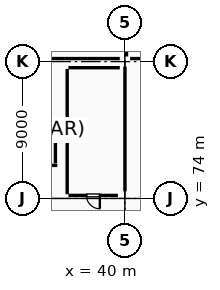
"""IFC4 building model, lengths in metres.
Left out: names, types, materials, properties, quantities, classifications, styles, units other than length and angle.
Written with IfcOpenShell. Run it as: python <this file> out.ifc"""

import sys

from ifc_helpers import new_model, si_unit, direction, frame, frame_2d, origin, origin_2d, place, context, subcontext, project, spatial, rectangle, extrude, element, fill, save


model = new_model("IFC4")
c1 = context("Model", 3, precision=1e-05, world=origin(), true_north=direction((0.0, 1.0)))
c2 = subcontext(c1, "Body", "Model", "MODEL_VIEW")
j1 = project(units=[si_unit("LENGTHUNIT", "METRE"), si_unit("PLANEANGLEUNIT", "RADIAN")], contexts=[c1])
p1 = place(None, origin())
s1 = spatial("IfcSite", under=j1, at=p1, CompositionType="ELEMENT")
p2 = place(p1, origin())
s2 = spatial("IfcBuilding", under=s1, at=p2, CompositionType="ELEMENT")
p3 = place(p2, origin())
s3 = spatial("IfcBuildingStorey", under=s2, at=p3, CompositionType="ELEMENT", Elevation=0.0)
p4 = place(p3, frame((40.0, 74.0, 0.0), z_axis=(0.0, 0.0, 1.0), x_axis=(1.0, 0.0, 0.0)))
e1 = element("IfcColumn", 1, at=p4, inside=s3, PredefinedType="COLUMN", context=c2, shape_type="SweptSolid", body=[
    extrude(rectangle(XDim=0.9, YDim=0.9, at=origin_2d()), origin(), (0.0, 0.0, 1.0), 5.4),
])
p5 = place(p3, frame((40.0, 83.0, 0.0), z_axis=(0.0, 0.0, 1.0), x_axis=(1.0, 0.0, 0.0)))
e2 = element("IfcColumn", 2, at=p5, inside=s3, PredefinedType="COLUMN", context=c2, shape_type="SweptSolid", body=[
    extrude(rectangle(XDim=0.65, YDim=0.65, at=origin_2d()), origin(), (0.0, 0.0, 1.0), 5.4),
])
p6 = place(p3, frame((33.25, 76.175, 0.0), z_axis=(0.0, 0.0, 1.0), x_axis=(1.0, 0.0, 0.0)))
e3 = element("IfcWall", 3, at=p6, inside=s3, PredefinedType="STANDARD", context=c2, shape_type="SweptSolid", body=[
    extrude(rectangle(XDim=2.3, YDim=0.25, at=frame_2d((1.15, 0.0))), origin(), (0.0, 0.0, 1.0), 5.11),
])
p7 = place(p6, frame((0.6, 0.0, 0.0)))
e4 = element("IfcOpeningElement", 4, at=p7, cuts=e3, PredefinedType="OPENING", context=c2, shape_type="SweptSolid", body=[
    extrude(rectangle(XDim=1.1, YDim=2.15, at=frame_2d((0.55, 1.075))), frame((0.0, 0.135, 0.0), z_axis=(0.0, -1.0, 0.0), x_axis=(1.0, 0.0, 0.0)), (0.0, 0.0, 1.0), 0.27),
])
p8 = place(p3, frame((35.55, 79.025, 0.0), z_axis=(0.0, 0.0, 1.0), x_axis=(-1.0, 0.0, 0.0)))
e5 = element("IfcWall", 5, at=p8, inside=s3, PredefinedType="STANDARD", context=c2, shape_type="SweptSolid", body=[
    extrude(rectangle(XDim=2.3, YDim=0.25, at=frame_2d((1.15, 0.0))), origin(), (0.0, 0.0, 1.0), 5.11),
])
p9 = place(p3, frame((35.425, 76.31, 0.0), z_axis=(0.0, 0.0, 1.0), x_axis=(0.0, 1.0, 0.0)))
e6 = element("IfcWall", 6, at=p9, inside=s3, PredefinedType="STANDARD", context=c2, shape_type="SweptSolid", body=[
    extrude(rectangle(XDim=2.58, YDim=0.25, at=frame_2d((1.29, 0.0))), origin(), (0.0, 0.0, 1.0), 5.11),
])
p10 = place(p3, frame((47.66, 83.2, 0.0), z_axis=(0.0, 0.0, 1.0), x_axis=(-1.0, 0.0, 0.0)))
e7 = element("IfcWall", 7, at=p10, inside=s3, PredefinedType="PARTITIONING", context=c2, shape_type="SweptSolid", body=[
    extrude(rectangle(XDim=7.32, YDim=0.2, at=frame_2d((3.66, 0.0))), origin(), (0.0, 0.0, 1.0), 4.8),
])
p11 = place(p3, frame((40.1, 83.34, 0.0), z_axis=(0.0, 0.0, 1.0), x_axis=(0.0, 1.0, 0.0)))
e8 = element("IfcWall", 8, at=p11, inside=s3, PredefinedType="PARTITIONING", context=c2, shape_type="SweptSolid", body=[
    extrude(rectangle(XDim=8.37, YDim=0.2, at=frame_2d((4.185, 0.0))), origin(), (0.0, 0.0, 1.0), 4.65),
])
p12 = place(p11, frame((3.66, 0.0, 0.0)))
e9 = element("IfcOpeningElement", 9, at=p12, cuts=e8, PredefinedType="OPENING", context=c2, shape_type="SweptSolid", body=[
    extrude(rectangle(XDim=1.05, YDim=2.15, at=frame_2d((0.525, 1.075))), frame((0.0, 0.11, 0.0), z_axis=(0.0, -1.0, 0.0), x_axis=(1.0, 0.0, 0.0)), (0.0, 0.0, 1.0), 0.22),
])
p13 = place(p11, frame((1.61, 0.0, 0.0)))
e10 = element("IfcOpeningElement", 10, at=p13, cuts=e8, PredefinedType="OPENING", context=c2, shape_type="SweptSolid", body=[
    extrude(rectangle(XDim=1.05, YDim=2.15, at=frame_2d((0.525, 1.075))), frame((0.0, 0.11, 0.0), z_axis=(0.0, -1.0, 0.0), x_axis=(1.0, 0.0, 0.0)), (0.0, 0.0, 1.0), 0.22),
])
p14 = place(p3, frame((39.66, 83.2, 0.0), z_axis=(0.0, 0.0, 1.0), x_axis=(-1.0, 0.0, 0.0)))
e11 = element("IfcWall", 11, at=p14, inside=s3, PredefinedType="PARTITIONING", context=c2, shape_type="SweptSolid", body=[
    extrude(rectangle(XDim=6.257, YDim=0.2, at=frame_2d((3.129, 0.0))), origin(), (0.0, 0.0, 1.0), 5.17),
])
p15 = place(p3, frame((40.0, 82.671, 0.0), z_axis=(0.0, 0.0, 1.0), x_axis=(0.0, -1.0, 0.0)))
e12 = element("IfcWall", 12, at=p15, inside=s3, PredefinedType="PARTITIONING", context=c2, shape_type="SweptSolid", body=[
    extrude(rectangle(XDim=8.206, YDim=0.12, at=frame_2d((4.103, 0.0))), origin(), (0.0, 0.0, 1.0), 4.6),
])
p16 = place(p3, frame((39.535, 74.2, 0.0), z_axis=(0.0, 0.0, 1.0), x_axis=(-1.0, 0.0, 0.0)))
e13 = element("IfcWall", 13, at=p16, inside=s3, PredefinedType="PARTITIONING", context=c2, shape_type="SweptSolid", body=[
    extrude(rectangle(XDim=3.255, YDim=0.12, at=frame_2d((1.627, 0.0))), origin(), (0.0, 0.0, 1.0), 5.11),
])
p17 = place(p16, frame((1.187, 0.0, 0.0)))
e14 = element("IfcOpeningElement", 14, at=p17, cuts=e13, PredefinedType="OPENING", context=c2, shape_type="SweptSolid", body=[
    extrude(rectangle(XDim=0.88, YDim=2.1, at=frame_2d((0.44, 1.05))), frame((0.0, 0.07, 0.0), z_axis=(0.0, -1.0, 0.0), x_axis=(1.0, 0.0, 0.0)), (0.0, 0.0, 1.0), 0.14),
])
p18 = place(p3, frame((36.2, 74.28, 0.0), z_axis=(0.0, 0.0, 1.0), x_axis=(0.0, 1.0, 0.0)))
e15 = element("IfcWall", 15, at=p18, inside=s3, PredefinedType="PARTITIONING", context=c2, shape_type="SweptSolid", body=[
    extrude(rectangle(XDim=8.24, YDim=0.12, at=frame_2d((4.12, 0.0))), origin(), (0.0, 0.0, 1.0), 5.11),
])
p19 = place(p3, frame((36.28, 82.6, 0.0), z_axis=(0.0, 0.0, 1.0), x_axis=(1.0, 0.0, 0.0)))
e16 = element("IfcWall", 16, at=p19, inside=s3, PredefinedType="PARTITIONING", context=c2, shape_type="SweptSolid", body=[
    extrude(rectangle(XDim=3.38, YDim=0.12, at=frame_2d((1.69, 0.0))), origin(), (0.0, 0.0, 1.0), 5.11),
])
p20 = place(p17, origin())
e17 = element("IfcDoor", 17, at=p20, inside=s3, OperationType="SINGLE_SWING_LEFT", PredefinedType="DOOR", context=c2, shape_type="SweptSolid", body=[
    extrude(rectangle(XDim=0.88, YDim=2.1, at=frame_2d((0.44, 1.05))), frame((0.0, 0.025, 0.0), z_axis=(0.0, -1.0, 0.0), x_axis=(1.0, 0.0, 0.0)), (0.0, 0.0, 1.0), 0.05),
])
fill(e14, e17)
save(model, sys.argv[1])
